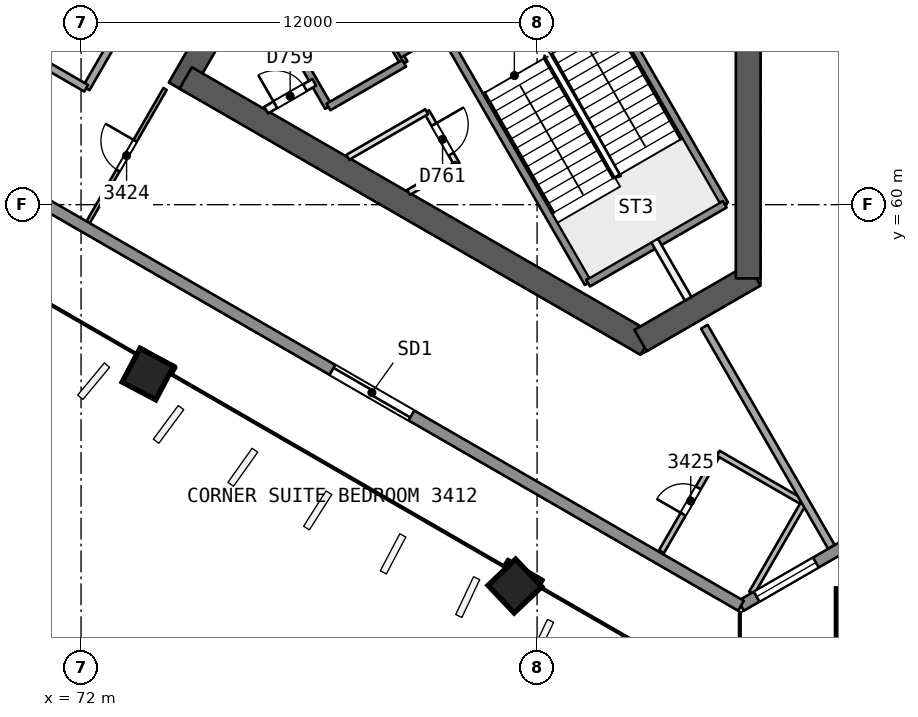
"""IFC4 building model, lengths in metres.
Left out: names, types, materials, properties, quantities, classifications, styles, units other than length and angle.
Written with IfcOpenShell. Run it as: python <this file> out.ifc"""

import sys

from ifc_helpers import new_model, si_unit, direction, frame, frame_2d, origin, origin_2d, place, context, subcontext, project, spatial, rectangle, extrude, element, fill, save


model = new_model("IFC4")
c1 = context("Model", 3, precision=1e-05, world=origin(), true_north=direction((0.0, 1.0)))
c2 = subcontext(c1, "Body", "Model", "MODEL_VIEW")
j1 = project(units=[si_unit("LENGTHUNIT", "METRE"), si_unit("PLANEANGLEUNIT", "RADIAN")], contexts=[c1])
p1 = place(None, origin())
s1 = spatial("IfcSite", under=j1, at=p1, CompositionType="ELEMENT")
p2 = place(p1, origin())
s2 = spatial("IfcBuilding", under=s1, at=p2, CompositionType="ELEMENT")
p3 = place(p2, frame((0.0, 0.0, 140.1)))
s3 = spatial("IfcBuildingStorey", under=s2, at=p3, CompositionType="ELEMENT", Elevation=140.1)
p4 = place(p3, frame((79.688, 71.881, 0.0), z_axis=(0.0, 0.0, 1.0), x_axis=(-0.49999822179, -0.866026430432, 0.0)))
e1 = element("IfcWall", 1, at=p4, inside=s3, PredefinedType="SHEAR", context=c2, shape_type="SweptSolid", body=[
    extrude(rectangle(XDim=10.192, YDim=0.65, at=frame_2d((5.096, 0.0))), origin(), (0.0, 0.0, 1.0), 3.7),
])
p5 = place(p4, frame((0.762, 0.0, 0.0)))
e2 = element("IfcOpeningElement", 2, at=p5, cuts=e1, PredefinedType="OPENING", context=c2, shape_type="SweptSolid", body=[
    extrude(rectangle(XDim=1.2, YDim=2.1, at=frame_2d((0.6, 1.05))), frame((0.0, 0.335, 0.0), z_axis=(0.0, -1.0, 0.0), x_axis=(1.0, 0.0, 0.0)), (0.0, 0.0, 1.0), 0.671),
])
p6 = place(p3, frame((74.754, 63.335, 0.0), z_axis=(0.0, 0.0, 1.0), x_axis=(0.866026250715, -0.49999853307, 0.0)))
e3 = element("IfcWall", 3, at=p6, inside=s3, PredefinedType="SHEAR", context=c2, shape_type="SweptSolid", body=[
    extrude(rectangle(XDim=14.008, YDim=0.65, at=frame_2d((7.004, 0.0))), origin(), (0.0, 0.0, 1.0), 3.7),
])
p7 = place(p3, frame((86.723, 56.425, 0.0), z_axis=(0.0, 0.0, 1.0), x_axis=(0.866031550877, 0.499989352773, 0.0)))
e4 = element("IfcWall", 4, at=p7, inside=s3, PredefinedType="SHEAR", context=c2, shape_type="SweptSolid", body=[
    extrude(rectangle(XDim=3.458, YDim=0.65, at=frame_2d((1.729, 0.0))), origin(), (0.0, 0.0, 1.0), 3.7),
])
p8 = place(p3, frame((89.555, 58.06, 0.0), z_axis=(0.0, 0.0, 1.0), x_axis=(0.0, 1.0, 0.0)))
e5 = element("IfcWall", 5, at=p8, inside=s3, PredefinedType="SHEAR", context=c2, shape_type="SweptSolid", body=[
    extrude(rectangle(XDim=14.146, YDim=0.65, at=frame_2d((7.073, 0.0))), origin(), (0.0, 0.0, 1.0), 3.7),
])
p9 = place(p3, frame((73.756, 55.514, 0.0), z_axis=(0.000857578916, 0.022824792675, 0.999739112668), x_axis=(-0.499938956565, -0.865825126557, 0.020196285069)))
e6 = element("IfcColumn", 6, at=p9, inside=s3, PredefinedType="COLUMN", context=c2, shape_type="SweptSolid", body=[
    extrude(rectangle(XDim=1.0, YDim=1.0, at=origin_2d()), origin(), (0.0, 0.0, 1.0), 3.701),
])
p10 = place(p3, frame((83.426, 49.931, 0.0), z_axis=(-0.008376454378, 0.028163354484, 0.999568237028), x_axis=(-0.500232049542, -0.86565577712, 0.020198320458)))
e7 = element("IfcColumn", 7, at=p10, inside=s3, PredefinedType="COLUMN", context=c2, shape_type="SweptSolid", body=[
    extrude(rectangle(XDim=1.0, YDim=1.0, at=origin_2d()), origin(), (0.0, 0.0, 1.0), 3.702),
])
p11 = place(p3, frame((93.096, 48.656, 0.0), z_axis=(-0.017607037296, 0.030466109479, 0.999380712447), x_axis=(0.50005800412, -0.865276719279, 0.035187946645)))
e8 = element("IfcColumn", 8, at=p11, inside=s3, PredefinedType="COLUMN", context=c2, shape_type="SweptSolid", body=[
    extrude(rectangle(XDim=2.4, YDim=2.4, at=origin_2d()), origin(), (0.0, 0.0, 1.0), 3.702),
])
p12 = place(p3, frame((88.401, 56.789, 0.0), z_axis=(0.0, 0.0, 1.0), x_axis=(0.499973018359, -0.866040981082, 0.0)))
e9 = element("IfcWall", 9, at=p12, inside=s3, PredefinedType="PARTITIONING", context=c2, shape_type="SweptSolid", body=[
    extrude(rectangle(XDim=6.691, YDim=0.2, at=frame_2d((3.346, 0.0))), origin(), (0.0, 0.0, 1.0), 3.25),
])
p13 = place(p3, frame((67.326, 62.343, 0.0), z_axis=(0.0, 0.0, 1.0), x_axis=(0.500002984678, 0.866023680573, 0.0)))
e10 = element("IfcWall", 10, at=p13, inside=s3, PredefinedType="PARTITIONING", context=c2, shape_type="SweptSolid", body=[
    extrude(rectangle(XDim=12.028, YDim=0.2, at=frame_2d((6.014, 0.0))), origin(), (0.0, 0.0, 1.0), 3.25),
])
p14 = place(p3, frame((72.186, 59.537, 0.0), z_axis=(0.0, 0.0, 1.0), x_axis=(0.499997320042, 0.866026951053, 0.0)))
e11 = element("IfcWall", 11, at=p14, inside=s3, PredefinedType="PARTITIONING", context=c2, shape_type="SweptSolid", body=[
    extrude(rectangle(XDim=4.049, YDim=0.1, at=frame_2d((2.025, 0.0))), origin(), (0.0, 0.0, 1.0), 3.25),
])
p15 = place(p14, frame((1.575, 0.0, 0.0)))
e12 = element("IfcOpeningElement", 12, at=p15, cuts=e11, PredefinedType="OPENING", context=c2, shape_type="SweptSolid", body=[
    extrude(rectangle(XDim=0.9, YDim=2.1, at=frame_2d((0.45, 1.05))), frame((0.0, 0.061, 0.0), z_axis=(0.0, -1.0, 0.0), x_axis=(1.0, 0.0, 0.0)), (0.0, 0.0, 1.0), 0.121),
])
p16 = place(p3, frame((76.636, 70.857, 0.0), z_axis=(0.0, 0.0, 1.0), x_axis=(-0.499990139034, -0.866031096941, 0.0)))
e13 = element("IfcWall", 13, at=p16, inside=s3, PredefinedType="PARTITIONING", context=c2, shape_type="SweptSolid", body=[
    extrude(rectangle(XDim=9.0, YDim=0.2, at=frame_2d((4.5, 0.0))), origin(), (0.0, 0.0, 1.0), 3.25),
])
p17 = place(p3, frame((72.136, 63.063, 0.0), z_axis=(0.0, 0.0, 1.0), x_axis=(-0.866010750942, 0.50002537861, 0.0)))
e14 = element("IfcWall", 14, at=p17, inside=s3, PredefinedType="PARTITIONING", context=c2, shape_type="SweptSolid", body=[
    extrude(rectangle(XDim=2.0, YDim=0.2, at=frame_2d((1.0, 0.0))), origin(), (0.0, 0.0, 1.0), 3.25),
])
p18 = place(p3, frame((70.404, 64.063, 0.0), z_axis=(0.0, 0.0, 1.0), x_axis=(0.499990139034, 0.866031096941, 0.0)))
e15 = element("IfcWall", 15, at=p18, inside=s3, PredefinedType="PARTITIONING", context=c2, shape_type="SweptSolid", body=[
    extrude(rectangle(XDim=9.0, YDim=0.2, at=frame_2d((4.5, 0.0))), origin(), (0.0, 0.0, 1.0), 3.25),
])
p19 = place(p18, frame((4.05, 0.0, 0.0)))
e16 = element("IfcOpeningElement", 16, at=p19, cuts=e15, PredefinedType="OPENING", context=c2, shape_type="SweptSolid", body=[
    extrude(rectangle(XDim=0.9, YDim=2.1, at=frame_2d((0.45, 1.05))), frame((0.0, 0.11, 0.0), z_axis=(0.0, -1.0, 0.0), x_axis=(1.0, 0.0, 0.0)), (0.0, 0.0, 1.0), 0.221),
])
p20 = place(p3, frame((87.275, 50.873, 0.0), z_axis=(0.0, 0.0, 1.0), x_axis=(0.500017373705, 0.866015372839, 0.0)))
e17 = element("IfcWall", 17, at=p20, inside=s3, PredefinedType="PARTITIONING", context=c2, shape_type="SweptSolid", body=[
    extrude(rectangle(XDim=2.986, YDim=0.15, at=frame_2d((1.493, 0.0))), origin(), (0.0, 0.0, 1.0), 3.25),
])
p21 = place(p20, frame((1.136, 0.0, 0.0)))
e18 = element("IfcOpeningElement", 18, at=p21, cuts=e17, PredefinedType="OPENING", context=c2, shape_type="SweptSolid", body=[
    extrude(rectangle(XDim=0.8, YDim=2.1, at=frame_2d((0.4, 1.05))), frame((0.0, 0.085, 0.0), z_axis=(0.0, -1.0, 0.0), x_axis=(1.0, 0.0, 0.0)), (0.0, 0.0, 1.0), 0.171),
])
p22 = place(p3, frame((88.768, 53.458, 0.0), z_axis=(0.0, 0.0, 1.0), x_axis=(0.866021400173, -0.500006934395, 0.0)))
e19 = element("IfcWall", 19, at=p22, inside=s3, PredefinedType="PARTITIONING", context=c2, shape_type="SweptSolid", body=[
    extrude(rectangle(XDim=2.6, YDim=0.15, at=frame_2d((1.3, 0.0))), origin(), (0.0, 0.0, 1.0), 3.25),
])
p23 = place(p3, frame((91.02, 52.158, 0.0), z_axis=(0.0, 0.0, 1.0), x_axis=(-0.500004836318, -0.866022611517, 0.0)))
e20 = element("IfcWall", 20, at=p23, inside=s3, PredefinedType="PARTITIONING", context=c2, shape_type="SweptSolid", body=[
    extrude(rectangle(XDim=2.744, YDim=0.15, at=frame_2d((1.372, 0.0))), origin(), (0.0, 0.0, 1.0), 3.25),
])
p24 = place(p3, frame((94.277, 52.283, 0.0), z_axis=(0.0, 0.0, 1.0), x_axis=(-0.866019999656, -0.500009360108, 0.0)))
e21 = element("IfcWall", 21, at=p24, inside=s3, PredefinedType="SOLIDWALL", context=c2, shape_type="SweptSolid", body=[
    extrude(rectangle(XDim=5.672, YDim=0.3, at=frame_2d((2.836, 0.0))), origin(), (0.0, 0.0, 1.0), 3.25),
])
p25 = place(p24, frame((3.396, 0.0, 0.9)))
e22 = element("IfcOpeningElement", 22, at=p25, cuts=e21, PredefinedType="OPENING", context=c2, shape_type="SweptSolid", body=[
    extrude(rectangle(XDim=1.8, YDim=1.5, at=frame_2d((0.9, 0.75))), frame((0.0, 0.161, 0.0), z_axis=(0.0, -1.0, 0.0), x_axis=(1.0, 0.0, 0.0)), (0.0, 0.0, 1.0), 0.321),
])
p26 = place(p24, frame((0.475, 0.0, 0.9)))
e23 = element("IfcOpeningElement", 23, at=p26, cuts=e21, PredefinedType="OPENING", context=c2, shape_type="SweptSolid", body=[
    extrude(rectangle(XDim=1.8, YDim=1.5, at=frame_2d((0.9, 0.75))), frame((0.0, 0.161, 0.0), z_axis=(0.0, -1.0, 0.0), x_axis=(1.0, 0.0, 0.0)), (0.0, 0.0, 1.0), 0.321),
])
p27 = place(p3, frame((89.365, 49.447, 0.0), z_axis=(0.0, 0.0, 1.0), x_axis=(-0.866024602029, 0.500001388679, 0.0)))
e24 = element("IfcWall", 24, at=p27, inside=s3, PredefinedType="SOLIDWALL", context=c2, shape_type="SweptSolid", body=[
    extrude(rectangle(XDim=55.434, YDim=0.3, at=frame_2d((27.717, 0.0))), origin(), (0.0, 0.0, 1.0), 3.25),
])
p28 = place(p27, frame((31.194, 0.0, 0.0)))
e25 = element("IfcOpeningElement", 25, at=p28, cuts=e24, PredefinedType="OPENING", context=c2, shape_type="SweptSolid", body=[
    extrude(rectangle(XDim=2.4, YDim=2.4, at=frame_2d((1.2, 1.2))), frame((0.0, 0.161, 0.0), z_axis=(0.0, -1.0, 0.0), x_axis=(1.0, 0.0, 0.0)), (0.0, 0.0, 1.0), 0.321),
])
p29 = place(p27, frame((43.056, 0.0, 0.0)))
e26 = element("IfcOpeningElement", 26, at=p29, cuts=e24, PredefinedType="OPENING", context=c2, shape_type="SweptSolid", body=[
    extrude(rectangle(XDim=2.4, YDim=2.4, at=frame_2d((1.2, 1.2))), frame((0.0, 0.161, 0.0), z_axis=(0.0, -1.0, 0.0), x_axis=(1.0, 0.0, 0.0)), (0.0, 0.0, 1.0), 0.321),
])
p30 = place(p27, frame((21.529, 0.0, 0.0)))
e27 = element("IfcOpeningElement", 27, at=p30, cuts=e24, PredefinedType="OPENING", context=c2, shape_type="SweptSolid", body=[
    extrude(rectangle(XDim=2.4, YDim=2.4, at=frame_2d((1.2, 1.2))), frame((0.0, 0.161, 0.0), z_axis=(0.0, -1.0, 0.0), x_axis=(1.0, 0.0, 0.0)), (0.0, 0.0, 1.0), 0.321),
])
p31 = place(p27, frame((10.014, 0.0, 0.0)))
e28 = element("IfcOpeningElement", 28, at=p31, cuts=e24, PredefinedType="OPENING", context=c2, shape_type="SweptSolid", body=[
    extrude(rectangle(XDim=2.4, YDim=2.4, at=frame_2d((1.2, 1.2))), frame((0.0, 0.161, 0.0), z_axis=(0.0, -1.0, 0.0), x_axis=(1.0, 0.0, 0.0)), (0.0, 0.0, 1.0), 0.321),
])
p32 = place(p27, frame((26.205, 0.0, 0.0)))
e29 = element("IfcOpeningElement", 29, at=p32, cuts=e24, PredefinedType="OPENING", context=c2, shape_type="SweptSolid", body=[
    extrude(rectangle(XDim=2.4, YDim=2.4, at=frame_2d((1.2, 1.2))), frame((0.0, 0.161, 0.0), z_axis=(0.0, -1.0, 0.0), x_axis=(1.0, 0.0, 0.0)), (0.0, 0.0, 1.0), 0.321),
])
p33 = place(p3, frame((77.135, 64.952, 0.0), z_axis=(0.0, 0.0, 1.0), x_axis=(0.499996545922, -0.866027397988, 0.0)))
e30 = element("IfcWall", 30, at=p33, inside=s3, PredefinedType="SOLIDWALL", context=c2, shape_type="SweptSolid", body=[
    extrude(rectangle(XDim=2.75, YDim=0.2, at=frame_2d((1.375, 0.0))), origin(), (0.0, 0.0, 1.0), 3.25),
])
p34 = place(p3, frame((81.094, 62.445, 0.0), z_axis=(0.0, 0.0, 1.0), x_axis=(0.499880961361, -0.866094119867, 0.0)))
e31 = element("IfcWall", 31, at=p34, inside=s3, PredefinedType="PARTITIONING", context=c2, shape_type="SweptSolid", body=[
    extrude(rectangle(XDim=1.6, YDim=0.15, at=frame_2d((0.8, 0.0))), origin(), (0.0, 0.0, 1.0), 3.25),
])
p35 = place(p34, frame((0.387, 0.0, 0.0)))
e32 = element("IfcOpeningElement", 32, at=p35, cuts=e31, PredefinedType="OPENING", context=c2, shape_type="SweptSolid", body=[
    extrude(rectangle(XDim=0.9, YDim=2.1, at=frame_2d((0.45, 1.05))), frame((0.0, 0.085, 0.0), z_axis=(0.0, -1.0, 0.0), x_axis=(1.0, 0.0, 0.0)), (0.0, 0.0, 1.0), 0.171),
])
p36 = place(p3, frame((79.127, 66.102, 0.0), z_axis=(0.0, 0.0, 1.0), x_axis=(0.499996545922, -0.866027397988, 0.0)))
e33 = element("IfcWall", 33, at=p36, inside=s3, PredefinedType="SOLIDWALL", context=c2, shape_type="SweptSolid", body=[
    extrude(rectangle(XDim=2.75, YDim=0.2, at=frame_2d((1.375, 0.0))), origin(), (0.0, 0.0, 1.0), 3.25),
])
p37 = place(p3, frame((81.493, 64.604, 0.0), z_axis=(0.0, 0.0, 1.0), x_axis=(0.500006057782, -0.866021906294, 0.0)))
e34 = element("IfcWall", 34, at=p37, inside=s3, PredefinedType="SOLIDWALL", context=c2, shape_type="SweptSolid", body=[
    extrude(rectangle(XDim=7.7, YDim=0.2, at=frame_2d((3.85, 0.0))), origin(), (0.0, 0.0, 1.0), 3.25),
])
p38 = place(p3, frame((87.09, 59.06, 0.0), z_axis=(0.0, 0.0, 1.0), x_axis=(0.499944938281, -0.866057191349, 0.0)))
e35 = element("IfcWall", 35, at=p38, inside=s3, PredefinedType="PARTITIONING", context=c2, shape_type="SweptSolid", body=[
    extrude(rectangle(XDim=1.773, YDim=0.2, at=frame_2d((0.887, 0.0))), origin(), (0.0, 0.0, 1.0), 3.25),
])
p39 = place(p3, frame((85.087, 66.679, 0.0), z_axis=(0.0, 0.0, 1.0), x_axis=(0.500019787375, -0.866013979237, 0.0)))
e36 = element("IfcWall", 36, at=p39, inside=s3, PredefinedType="SOLIDWALL", context=c2, shape_type="SweptSolid", body=[
    extrude(rectangle(XDim=7.7, YDim=0.2, at=frame_2d((3.85, 0.0))), origin(), (0.0, 0.0, 1.0), 3.25),
])
p40 = place(p39, frame((0.55, 0.0, 0.0)))
e37 = element("IfcOpeningElement", 37, at=p40, cuts=e36, PredefinedType="OPENING", context=c2, shape_type="SweptSolid", body=[
    extrude(rectangle(XDim=1.1, YDim=2.1, at=frame_2d((0.55, 1.05))), frame((0.0, 0.11, 0.0), z_axis=(0.0, -1.0, 0.0), x_axis=(1.0, 0.0, 0.0)), (0.0, 0.0, 1.0), 0.221),
])
p41 = place(p3, frame((76.87, 62.489, 0.0), z_axis=(0.0, 0.0, 1.0), x_axis=(0.866054810376, 0.49994906283, 0.0)))
e38 = element("IfcWall", 38, at=p41, inside=s3, PredefinedType="PARTITIONING", context=c2, shape_type="SweptSolid", body=[
    extrude(rectangle(XDim=1.461, YDim=0.2, at=frame_2d((0.73, 0.0))), origin(), (0.0, 0.0, 1.0), 3.25),
])
p42 = place(p41, frame((0.281, 0.0, 0.0)))
e39 = element("IfcOpeningElement", 39, at=p42, cuts=e38, PredefinedType="OPENING", context=c2, shape_type="SweptSolid", body=[
    extrude(rectangle(XDim=0.9, YDim=2.1, at=frame_2d((0.45, 1.05))), frame((0.0, 0.11, 0.0), z_axis=(0.0, -1.0, 0.0), x_axis=(1.0, 0.0, 0.0)), (0.0, 0.0, 1.0), 0.221),
])
p43 = place(p3, frame((80.367, 63.954, 0.0), z_axis=(0.0, 0.0, 1.0), x_axis=(0.866026575979, 0.499997969693, 0.0)))
e40 = element("IfcWall", 40, at=p43, inside=s3, PredefinedType="SOLIDWALL", context=c2, shape_type="SweptSolid", body=[
    extrude(rectangle(XDim=6.75, YDim=0.2, at=frame_2d((3.375, 0.0))), origin(), (0.0, 0.0, 1.0), 3.25),
])
p44 = place(p3, frame((78.51, 62.57, 0.0), z_axis=(0.0, 0.0, 1.0), x_axis=(0.866053019151, 0.499952165731, 0.0)))
e41 = element("IfcWall", 41, at=p44, inside=s3, PredefinedType="SOLIDWALL", context=c2, shape_type="SweptSolid", body=[
    extrude(rectangle(XDim=2.3, YDim=0.2, at=frame_2d((1.15, 0.0))), origin(), (0.0, 0.0, 1.0), 3.25),
])
p45 = place(p3, frame((79.02, 61.248, 0.0), z_axis=(0.0, 0.0, 1.0), x_axis=(0.866051471819, 0.499954846121, 0.0)))
e42 = element("IfcWall", 42, at=p45, inside=s3, PredefinedType="PARTITIONING", context=c2, shape_type="SweptSolid", body=[
    extrude(rectangle(XDim=2.395, YDim=0.15, at=frame_2d((1.197, 0.0))), origin(), (0.0, 0.0, 1.0), 3.25),
])
p46 = place(p3, frame((80.62, 60.324, 0.0), z_axis=(0.0, 0.0, 1.0), x_axis=(0.866069507536, 0.49992360228, 0.0)))
e43 = element("IfcWall", 43, at=p46, inside=s3, PredefinedType="PARTITIONING", context=c2, shape_type="SweptSolid", body=[
    extrude(rectangle(XDim=1.471, YDim=0.15, at=frame_2d((0.735, 0.0))), origin(), (0.0, 0.0, 1.0), 3.25),
])
p47 = place(p3, frame((85.343, 57.935, 0.0), z_axis=(0.0, 0.0, 1.0), x_axis=(0.866004344652, 0.500036473714, 0.0)))
e44 = element("IfcWall", 44, at=p47, inside=s3, PredefinedType="SOLIDWALL", context=c2, shape_type="SweptSolid", body=[
    extrude(rectangle(XDim=4.15, YDim=0.2, at=frame_2d((2.075, 0.0))), origin(), (0.0, 0.0, 1.0), 3.25),
])
p48 = place(p15, origin())
e45 = element("IfcDoor", 45, at=p48, inside=s3, OperationType="SINGLE_SWING_RIGHT", PredefinedType="NOTDEFINED", context=c2, shape_type="SweptSolid", body=[
    extrude(rectangle(XDim=0.9, YDim=2.1, at=frame_2d((0.45, 1.05))), frame((0.0, 0.025, 0.0), z_axis=(0.0, -1.0, 0.0), x_axis=(1.0, 0.0, 0.0)), (0.0, 0.0, 1.0), 0.05),
])
fill(e12, e45)
p49 = place(p21, origin())
e46 = element("IfcDoor", 46, at=p49, inside=s3, OperationType="SINGLE_SWING_LEFT", PredefinedType="NOTDEFINED", context=c2, shape_type="SweptSolid", body=[
    extrude(rectangle(XDim=0.8, YDim=2.1, at=frame_2d((0.4, 1.05))), frame((0.0, 0.025, 0.0), z_axis=(0.0, -1.0, 0.0), x_axis=(1.0, 0.0, 0.0)), (0.0, 0.0, 1.0), 0.05),
])
fill(e18, e46)
p50 = place(p25, origin())
e47 = element("IfcWindow", 47, at=p50, inside=s3, PartitioningType="SINGLE_PANEL", PredefinedType="WINDOW", context=c2, shape_type="SweptSolid", body=[
    extrude(rectangle(XDim=1.8, YDim=1.5, at=frame_2d((0.9, 0.75))), frame((0.0, 0.03, 0.0), z_axis=(0.0, -1.0, 0.0), x_axis=(1.0, 0.0, 0.0)), (0.0, 0.0, 1.0), 0.06),
])
fill(e22, e47)
p51 = place(p31, origin())
e48 = element("IfcDoor", 48, at=p51, inside=s3, OperationType="SLIDING_TO_RIGHT", PredefinedType="NOTDEFINED", context=c2, shape_type="SweptSolid", body=[
    extrude(rectangle(XDim=2.4, YDim=2.4, at=frame_2d((1.2, 1.2))), frame((0.0, 0.025, 0.0), z_axis=(0.0, -1.0, 0.0), x_axis=(1.0, 0.0, 0.0)), (0.0, 0.0, 1.0), 0.05),
])
fill(e28, e48)
p52 = place(p42, origin())
e49 = element("IfcDoor", 49, at=p52, inside=s3, OperationType="SINGLE_SWING_LEFT", PredefinedType="NOTDEFINED", context=c2, shape_type="SweptSolid", body=[
    extrude(rectangle(XDim=0.9, YDim=2.1, at=frame_2d((0.45, 1.05))), frame((0.0, 0.025, 0.0), z_axis=(0.0, -1.0, 0.0), x_axis=(1.0, 0.0, 0.0)), (0.0, 0.0, 1.0), 0.05),
])
fill(e39, e49)
p53 = place(p35, origin())
e50 = element("IfcDoor", 50, at=p53, inside=s3, OperationType="SINGLE_SWING_LEFT", PredefinedType="NOTDEFINED", context=c2, shape_type="SweptSolid", body=[
    extrude(rectangle(XDim=0.9, YDim=2.1, at=frame_2d((0.45, 1.05))), frame((0.0, 0.025, 0.0), z_axis=(0.0, -1.0, 0.0), x_axis=(1.0, 0.0, 0.0)), (0.0, 0.0, 1.0), 0.05),
])
fill(e32, e50)
save(model, sys.argv[1])
